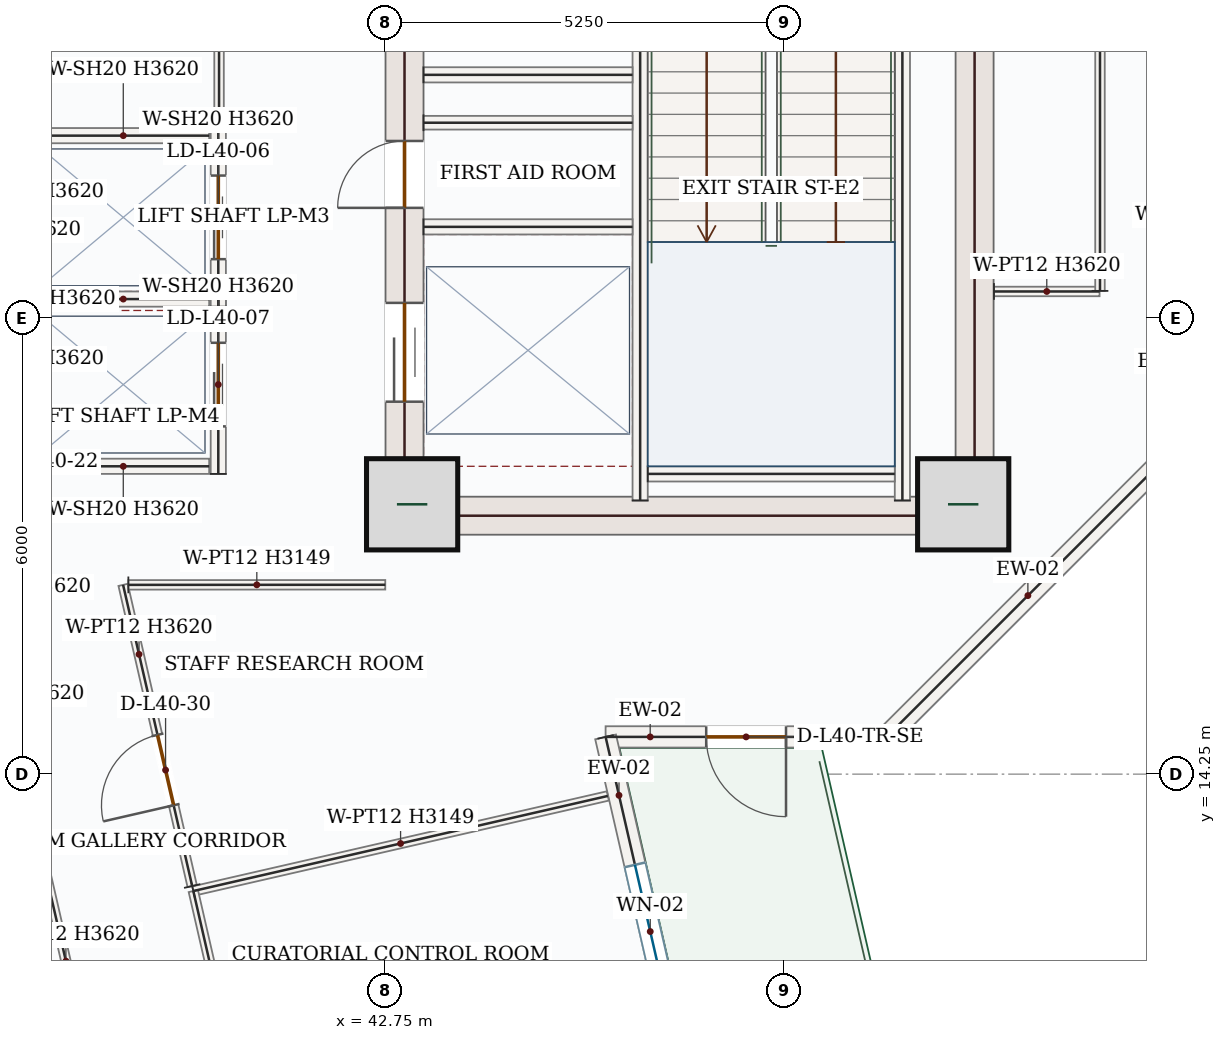
"""IFC4 building model, lengths in metres.
Left out: names, types, materials, properties, quantities, classifications, styles, units other than length and angle.
Written with IfcOpenShell. Run it as: python <this file> out.ifc"""

import sys

from ifc_helpers import new_model, si_unit, direction, frame, frame_2d, origin, origin_2d, place, context, subcontext, project, spatial, rectangle, extrude, source, transform, mapped, element, fill, save


model = new_model("IFC4")
c1 = context("Model", 3, precision=1e-05, world=origin(), true_north=direction((0.0, 1.0)))
c2 = subcontext(c1, "Body", "Model", "MODEL_VIEW")
j1 = project(units=[si_unit("LENGTHUNIT", "METRE"), si_unit("PLANEANGLEUNIT", "RADIAN")], contexts=[c1])
p1 = place(None, origin())
s1 = spatial("IfcSite", under=j1, at=p1, CompositionType="ELEMENT")
p2 = place(p1, origin())
s2 = spatial("IfcBuilding", under=s1, at=p2, CompositionType="ELEMENT")
p3 = place(p2, frame((0.0, 0.0, 174.6)))
s3 = spatial("IfcBuildingStorey", under=s2, at=p3, CompositionType="ELEMENT", Elevation=174.6)
p4 = place(p3, frame((43.0, 17.4, 0.0), z_axis=(0.0, 0.0, 1.0), x_axis=(0.0, 1.0, 0.0)))
e1 = element("IfcWall", 1, at=p4, inside=s3, PredefinedType="SHEAR", context=c2, shape_type="SweptSolid", body=[
    extrude(rectangle(XDim=8.55, YDim=0.5, at=frame_2d((4.275, 0.0))), origin(), (0.0, 0.0, 1.0), 3.62),
])
p5 = place(p4, frame((6.65, 0.0, 0.0)))
e2 = element("IfcOpeningElement", 2, at=p5, cuts=e1, PredefinedType="OPENING", context=c2, shape_type="SweptSolid", body=[
    extrude(rectangle(XDim=1.1, YDim=2.2, at=frame_2d((0.55, 1.1))), frame((0.0, 0.26, 0.0), z_axis=(0.0, -1.0, 0.0), x_axis=(1.0, 0.0, 0.0)), (0.0, 0.0, 1.0), 0.52),
])
p6 = place(p4, frame((1.75, 0.0, 0.0)))
e3 = element("IfcOpeningElement", 3, at=p6, cuts=e1, PredefinedType="OPENING", context=c2, shape_type="SweptSolid", body=[
    extrude(rectangle(XDim=1.3, YDim=2.2, at=frame_2d((0.65, 1.1))), frame((0.0, 0.26, 0.0), z_axis=(0.0, -1.0, 0.0), x_axis=(1.0, 0.0, 0.0)), (0.0, 0.0, 1.0), 0.52),
])
p7 = place(p4, frame((4.3, 0.0, 0.0)))
e4 = element("IfcOpeningElement", 4, at=p7, cuts=e1, PredefinedType="OPENING", context=c2, shape_type="SweptSolid", body=[
    extrude(rectangle(XDim=0.88, YDim=2.1, at=frame_2d((0.44, 1.05))), frame((0.0, 0.26, 0.0), z_axis=(0.0, -1.0, 0.0), x_axis=(1.0, 0.0, 0.0)), (0.0, 0.0, 1.0), 0.52),
])
m1 = source(origin(), c2, "Body", "SweptSolid", [
    extrude(rectangle(XDim=8.55, YDim=0.5, at=frame_2d((4.275, 0.0))), origin(), (0.0, 0.0, 1.0), 3.62),
])
p8 = place(p3, frame((50.5, 17.4, 0.0), z_axis=(0.0, 0.0, 1.0), x_axis=(0.0, 1.0, 0.0)))
e5 = element("IfcWall", 5, at=p8, inside=s3, PredefinedType="SHEAR", context=c2, shape_type="MappedRepresentation", body=[
    mapped(m1, transform((0.0, 0.0, 0.0), x_axis=(1.0, 0.0, 0.0), y_axis=(0.0, 1.0, 0.0), z_axis=(0.0, 0.0, 1.0), scale=1.0)),
])
m2 = source(origin(), c2, "Body", "SweptSolid", [
    extrude(rectangle(XDim=7.0, YDim=0.5, at=frame_2d((3.5, 0.0))), origin(), (0.0, 0.0, 1.0), 3.62),
])
p9 = place(p3, frame((43.25, 17.65, 0.0), z_axis=(0.0, 0.0, 1.0), x_axis=(1.0, 0.0, 0.0)))
e6 = element("IfcWall", 6, at=p9, inside=s3, PredefinedType="SHEAR", context=c2, shape_type="MappedRepresentation", body=[
    mapped(m2, transform((0.0, 0.0, 0.0), x_axis=(1.0, 0.0, 0.0), y_axis=(0.0, 1.0, 0.0), z_axis=(0.0, 0.0, 1.0), scale=1.0)),
])
m3 = source(origin(), c2, "Body", "SweptSolid", [
    extrude(rectangle(XDim=1.2, YDim=1.2, at=origin_2d()), origin(), (0.0, 0.0, 1.0), 3.9),
])
for number, where, z_axis, x_axis in (
    (7, (43.1, 17.8, 0.0), (0.0, 0.0, 1.0), (1.0, 0.0, 0.0)),
    (8, (50.35, 17.8, 0.0), (0.0, 0.0, 1.0), (1.0, 0.0, 0.0)),
):
    element("IfcColumn", number, at=place(p3, frame(where, z_axis=z_axis, x_axis=x_axis)), inside=s3, PredefinedType="COLUMN", context=c2, shape_type="MappedRepresentation", body=[
        mapped(m3, transform((0.0, 0.0, 0.0), x_axis=(1.0, 0.0, 0.0), y_axis=(0.0, 1.0, 0.0), z_axis=(0.0, 0.0, 1.0), scale=1.0)),
    ])
m4 = source(origin(), c2, "Body", "SweptSolid", [
    extrude(rectangle(XDim=5.258, YDim=0.28, at=frame_2d((2.629, 0.0))), origin(), (0.0, 0.0, 1.0), 3.62),
])
p10 = place(p3, frame((53.06, 18.458, 0.0), z_axis=(0.0, 0.0, 1.0), x_axis=(-0.707106781187, -0.707106781187, 0.0)))
e9 = element("IfcWall", 9, at=p10, inside=s3, PredefinedType="SOLIDWALL", context=c2, shape_type="MappedRepresentation", body=[
    mapped(m4, transform((0.0, 0.0, 0.0), x_axis=(1.0, 0.0, 0.0), y_axis=(0.0, 1.0, 0.0), z_axis=(0.0, 0.0, 1.0), scale=1.0)),
])
p11 = place(p3, frame((49.342, 14.74, 0.0), z_axis=(0.0, 0.0, 1.0), x_axis=(-1.0, 0.0, 0.0)))
e10 = element("IfcWall", 10, at=p11, inside=s3, PredefinedType="SOLIDWALL", context=c2, shape_type="SweptSolid", body=[
    extrude(rectangle(XDim=3.697, YDim=0.28, at=frame_2d((1.848, 0.0))), origin(), (0.0, 0.0, 1.0), 3.62),
])
p12 = place(p11, frame((1.323, 0.0, 0.0)))
e11 = element("IfcOpeningElement", 11, at=p12, cuts=e10, PredefinedType="OPENING", context=c2, shape_type="SweptSolid", body=[
    extrude(rectangle(XDim=1.05, YDim=2.15, at=frame_2d((0.525, 1.075))), frame((0.0, 0.15, 0.0), z_axis=(0.0, -1.0, 0.0), x_axis=(1.0, 0.0, 0.0)), (0.0, 0.0, 1.0), 0.3),
])
p13 = place(p3, frame((45.646, 14.74, 0.0), z_axis=(0.0, 0.0, 1.0), x_axis=(0.223562871808, -0.974689510741, 0.0)))
e12 = element("IfcWall", 12, at=p13, inside=s3, PredefinedType="SOLIDWALL", context=c2, shape_type="SweptSolid", body=[
    extrude(rectangle(XDim=5.254, YDim=0.28, at=frame_2d((2.627, 0.0))), origin(), (0.0, 0.0, 1.0), 3.62),
])
p14 = place(p13, frame((1.727, 0.0, 0.85)))
e13 = element("IfcOpeningElement", 13, at=p14, cuts=e12, PredefinedType="OPENING", context=c2, shape_type="SweptSolid", body=[
    extrude(rectangle(XDim=1.8, YDim=1.75, at=frame_2d((0.9, 0.875))), frame((0.0, 0.15, 0.0), z_axis=(0.0, -1.0, 0.0), x_axis=(1.0, 0.0, 0.0)), (0.0, 0.0, 1.0), 0.3),
])
m5 = source(origin(), c2, "Body", "SweptSolid", [
    extrude(rectangle(XDim=7.87, YDim=0.2, at=frame_2d((3.935, 0.0))), origin(), (0.0, 0.0, 1.0), 3.62),
])
p15 = place(p3, frame((49.55, 17.85, 0.0), z_axis=(0.0, 0.0, 1.0), x_axis=(0.0, 1.0, 0.0)))
e14 = element("IfcWall", 14, at=p15, inside=s3, PredefinedType="SOLIDWALL", context=c2, shape_type="MappedRepresentation", body=[
    mapped(m5, transform((0.0, 0.0, 0.0), x_axis=(1.0, 0.0, 0.0), y_axis=(0.0, 1.0, 0.0), z_axis=(0.0, 0.0, 1.0), scale=1.0)),
])
p16 = place(p3, frame((46.1, 17.85, 0.0), z_axis=(0.0, 0.0, 1.0), x_axis=(0.0, 1.0, 0.0)))
e15 = element("IfcWall", 15, at=p16, inside=s3, PredefinedType="SOLIDWALL", context=c2, shape_type="SweptSolid", body=[
    extrude(rectangle(XDim=8.0, YDim=0.2, at=frame_2d((4.0, 0.0))), origin(), (0.0, 0.0, 1.0), 3.62),
])
p17 = place(p16, frame((6.3, 0.0, 0.0)))
e16 = element("IfcOpeningElement", 16, at=p17, cuts=e15, PredefinedType="OPENING", context=c2, shape_type="SweptSolid", body=[
    extrude(rectangle(XDim=1.05, YDim=2.15, at=frame_2d((0.525, 1.075))), frame((0.0, 0.11, 0.0), z_axis=(0.0, -1.0, 0.0), x_axis=(1.0, 0.0, 0.0)), (0.0, 0.0, 1.0), 0.22),
])
m6 = source(origin(), c2, "Body", "SweptSolid", [
    extrude(rectangle(XDim=3.25, YDim=0.2, at=frame_2d((1.625, 0.0))), origin(), (0.0, 0.0, 1.0), 3.62),
])
p18 = place(p3, frame((46.2, 18.2, 0.0), z_axis=(0.0, 0.0, 1.0), x_axis=(1.0, 0.0, 0.0)))
e17 = element("IfcWall", 17, at=p18, inside=s3, PredefinedType="SOLIDWALL", context=c2, shape_type="MappedRepresentation", body=[
    mapped(m6, transform((0.0, 0.0, 0.0), x_axis=(1.0, 0.0, 0.0), y_axis=(0.0, 1.0, 0.0), z_axis=(0.0, 0.0, 1.0), scale=1.0)),
])
m7 = source(origin(), c2, "Body", "SweptSolid", [
    extrude(rectangle(XDim=2.75, YDim=0.2, at=frame_2d((1.375, 0.0))), origin(), (0.0, 0.0, 1.0), 3.62),
])
for number, where, z_axis, x_axis in (
    (18, (43.25, 23.45, 0.0), (0.0, 0.0, 1.0), (1.0, 0.0, 0.0)),
    (19, (43.25, 21.45, 0.0), (0.0, 0.0, 1.0), (1.0, 0.0, 0.0)),
):
    element("IfcWall", number, at=place(p3, frame(where, z_axis=z_axis, x_axis=x_axis)), inside=s3, PredefinedType="SOLIDWALL", context=c2, shape_type="MappedRepresentation", body=[
        mapped(m7, transform((0.0, 0.0, 0.0), x_axis=(1.0, 0.0, 0.0), y_axis=(0.0, 1.0, 0.0), z_axis=(0.0, 0.0, 1.0), scale=1.0)),
    ])
m8 = source(origin(), c2, "Body", "SweptSolid", [
    extrude(rectangle(XDim=2.75, YDim=0.18, at=frame_2d((1.375, 0.0))), origin(), (0.0, 0.0, 1.0), 3.62),
])
p19 = place(p3, frame((43.25, 22.82, 0.0), z_axis=(0.0, 0.0, 1.0), x_axis=(1.0, 0.0, 0.0)))
e20 = element("IfcWall", 20, at=p19, inside=s3, PredefinedType="PARTITIONING", context=c2, shape_type="MappedRepresentation", body=[
    mapped(m8, transform((0.0, 0.0, 0.0), x_axis=(1.0, 0.0, 0.0), y_axis=(0.0, 1.0, 0.0), z_axis=(0.0, 0.0, 1.0), scale=1.0)),
])
p20 = place(p3, frame((40.55, 20.4, 0.0), z_axis=(0.0, 0.0, 1.0), x_axis=(0.0, 1.0, 0.0)))
e21 = element("IfcWall", 21, at=p20, inside=s3, PredefinedType="SOLIDWALL", context=c2, shape_type="SweptSolid", body=[
    extrude(rectangle(XDim=2.35, YDim=0.2, at=frame_2d((1.175, 0.0))), origin(), (0.0, 0.0, 1.0), 3.62),
])
p21 = place(p20, frame((0.625, 0.0, 0.0)))
e22 = element("IfcOpeningElement", 22, at=p21, cuts=e21, PredefinedType="OPENING", context=c2, shape_type="SweptSolid", body=[
    extrude(rectangle(XDim=1.1, YDim=2.15, at=frame_2d((0.55, 1.075))), frame((0.0, 0.11, 0.0), z_axis=(0.0, -1.0, 0.0), x_axis=(1.0, 0.0, 0.0)), (0.0, 0.0, 1.0), 0.22),
])
m9 = source(origin(), c2, "Body", "SweptSolid", [
    extrude(rectangle(XDim=2.26, YDim=0.2, at=frame_2d((1.13, 0.0))), origin(), (0.0, 0.0, 1.0), 3.62),
])
for number, where, z_axis, x_axis in (
    (23, (38.17, 20.5, 0.0), (0.0, 0.0, 1.0), (1.0, 0.0, 0.0)),
    (24, (38.17, 22.65, 0.0), (0.0, 0.0, 1.0), (1.0, 0.0, 0.0)),
):
    element("IfcWall", number, at=place(p3, frame(where, z_axis=z_axis, x_axis=x_axis)), inside=s3, PredefinedType="SOLIDWALL", context=c2, shape_type="MappedRepresentation", body=[
        mapped(m9, transform((0.0, 0.0, 0.0), x_axis=(1.0, 0.0, 0.0), y_axis=(0.0, 1.0, 0.0), z_axis=(0.0, 0.0, 1.0), scale=1.0)),
    ])
p22 = place(p3, frame((40.55, 18.2, 0.0), z_axis=(0.0, 0.0, 1.0), x_axis=(0.0, 1.0, 0.0)))
e25 = element("IfcWall", 25, at=p22, inside=s3, PredefinedType="SOLIDWALL", context=c2, shape_type="SweptSolid", body=[
    extrude(rectangle(XDim=2.35, YDim=0.2, at=frame_2d((1.175, 0.0))), origin(), (0.0, 0.0, 1.0), 3.62),
])
p23 = place(p22, frame((0.625, 0.0, 0.0)))
e26 = element("IfcOpeningElement", 26, at=p23, cuts=e25, PredefinedType="OPENING", context=c2, shape_type="SweptSolid", body=[
    extrude(rectangle(XDim=1.1, YDim=2.15, at=frame_2d((0.55, 1.075))), frame((0.0, 0.11, 0.0), z_axis=(0.0, -1.0, 0.0), x_axis=(1.0, 0.0, 0.0)), (0.0, 0.0, 1.0), 0.22),
])
p24 = place(p3, frame((38.17, 18.3, 0.0), z_axis=(0.0, 0.0, 1.0), x_axis=(1.0, 0.0, 0.0)))
e27 = element("IfcWall", 27, at=p24, inside=s3, PredefinedType="SOLIDWALL", context=c2, shape_type="MappedRepresentation", body=[
    mapped(m9, transform((0.0, 0.0, 0.0), x_axis=(1.0, 0.0, 0.0), y_axis=(0.0, 1.0, 0.0), z_axis=(0.0, 0.0, 1.0), scale=1.0)),
])
m10 = source(origin(), c2, "Body", "SweptSolid", [
    extrude(rectangle(XDim=3.042, YDim=0.125, at=frame_2d((1.521, 0.0))), origin(), (0.0, 0.0, 1.0), 3.62),
])
p25 = place(p3, frame((40.56, 25.792, 0.0), z_axis=(0.0, 0.0, 1.0), x_axis=(0.0, -1.0, 0.0)))
e28 = element("IfcWall", 28, at=p25, inside=s3, PredefinedType="PARTITIONING", context=c2, shape_type="MappedRepresentation", body=[
    mapped(m10, transform((0.0, 0.0, 0.0), x_axis=(1.0, 0.0, 0.0), y_axis=(0.0, 1.0, 0.0), z_axis=(0.0, 0.0, 1.0), scale=1.0)),
])
m11 = source(origin(), c2, "Body", "SweptSolid", [
    extrude(rectangle(XDim=5.595, YDim=0.125, at=frame_2d((2.797, 0.0))), origin(), (0.0, 0.0, 1.0), 3.149),
])
p26 = place(p3, frame((40.221, 12.712, 0.0), z_axis=(0.0, 0.0, 1.0), x_axis=(0.974683801791, 0.223587760235, 0.0)))
e29 = element("IfcWall", 29, at=p26, inside=s3, PredefinedType="PARTITIONING", context=c2, shape_type="MappedRepresentation", body=[
    mapped(m11, transform((0.0, 0.0, 0.0), x_axis=(1.0, 0.0, 0.0), y_axis=(0.0, 1.0, 0.0), z_axis=(0.0, 0.0, 1.0), scale=1.0)),
])
p27 = place(p3, frame((41.573, 6.82, 0.0), z_axis=(0.0, 0.0, 1.0), x_axis=(-0.223588000718, 0.974683746625, 0.0)))
e30 = element("IfcWall", 30, at=p27, inside=s3, PredefinedType="PARTITIONING", context=c2, shape_type="SweptSolid", body=[
    extrude(rectangle(XDim=6.045, YDim=0.125, at=frame_2d((3.022, 0.0))), origin(), (0.0, 0.0, 1.0), 3.62),
])
p28 = place(p27, frame((3.312, 0.0, 0.0)))
e31 = element("IfcOpeningElement", 31, at=p28, cuts=e30, PredefinedType="OPENING", context=c2, shape_type="SweptSolid", body=[
    extrude(rectangle(XDim=0.95, YDim=2.15, at=frame_2d((0.475, 1.075))), frame((0.0, 0.073, 0.0), z_axis=(0.0, -1.0, 0.0), x_axis=(1.0, 0.0, 0.0)), (0.0, 0.0, 1.0), 0.145),
])
p29 = place(p3, frame((40.206, 12.778, 0.0), z_axis=(0.0, 0.0, 1.0), x_axis=(-0.223552104445, 0.97469198037, 0.0)))
e32 = element("IfcWall", 32, at=p29, inside=s3, PredefinedType="PARTITIONING", context=c2, shape_type="SweptSolid", body=[
    extrude(rectangle(XDim=4.065, YDim=0.125, at=frame_2d((2.032, 0.0))), origin(), (0.0, 0.0, 1.0), 3.62),
])
p30 = place(p29, frame((1.09, 0.0, 0.0)))
e33 = element("IfcOpeningElement", 33, at=p30, cuts=e32, PredefinedType="OPENING", context=c2, shape_type="SweptSolid", body=[
    extrude(rectangle(XDim=0.95, YDim=2.15, at=frame_2d((0.475, 1.075))), frame((0.0, 0.073, 0.0), z_axis=(0.0, -1.0, 0.0), x_axis=(1.0, 0.0, 0.0)), (0.0, 0.0, 1.0), 0.145),
])
m12 = source(origin(), c2, "Body", "SweptSolid", [
    extrude(rectangle(XDim=3.38, YDim=0.125, at=frame_2d((1.69, 0.0))), origin(), (0.0, 0.0, 1.0), 3.149),
])
p31 = place(p3, frame((39.367, 16.74, 0.0), z_axis=(0.0, 0.0, 1.0), x_axis=(0.999999934779, 0.000361167269, 0.0)))
e34 = element("IfcWall", 34, at=p31, inside=s3, PredefinedType="PARTITIONING", context=c2, shape_type="MappedRepresentation", body=[
    mapped(m12, transform((0.0, 0.0, 0.0), x_axis=(1.0, 0.0, 0.0), y_axis=(0.0, 1.0, 0.0), z_axis=(0.0, 0.0, 1.0), scale=1.0)),
])
p32 = place(p3, frame((38.227, 13.178, 0.0), z_axis=(0.0, 0.0, 1.0), x_axis=(0.223573066544, -0.974687172336, 0.0)))
e35 = element("IfcWall", 35, at=p32, inside=s3, PredefinedType="PARTITIONING", context=c2, shape_type="SweptSolid", body=[
    extrude(rectangle(XDim=6.945, YDim=0.125, at=frame_2d((3.473, 0.0))), origin(), (0.0, 0.0, 1.0), 3.62),
])
p33 = place(p32, frame((2.998, 0.0, 0.0)))
e36 = element("IfcOpeningElement", 36, at=p33, cuts=e35, PredefinedType="OPENING", context=c2, shape_type="SweptSolid", body=[
    extrude(rectangle(XDim=0.95, YDim=2.15, at=frame_2d((0.475, 1.075))), frame((0.0, 0.073, 0.0), z_axis=(0.0, -1.0, 0.0), x_axis=(1.0, 0.0, 0.0)), (0.0, 0.0, 1.0), 0.145),
])
m13 = source(origin(), c2, "Body", "SweptSolid", [
    extrude(rectangle(XDim=1.389, YDim=0.125, at=frame_2d((0.695, 0.0))), origin(), (0.0, 0.0, 1.0), 3.62),
])
p34 = place(p3, frame((50.755, 20.6, 0.0), z_axis=(0.0, 0.0, 1.0), x_axis=(1.0, 0.0, 0.0)))
e37 = element("IfcWall", 37, at=p34, inside=s3, PredefinedType="PARTITIONING", context=c2, shape_type="MappedRepresentation", body=[
    mapped(m13, transform((0.0, 0.0, 0.0), x_axis=(1.0, 0.0, 0.0), y_axis=(0.0, 1.0, 0.0), z_axis=(0.0, 0.0, 1.0), scale=1.0)),
])
m14 = source(origin(), c2, "Body", "SweptSolid", [
    extrude(rectangle(XDim=9.153, YDim=0.125, at=frame_2d((4.577, 0.0))), origin(), (0.0, 0.0, 1.0), 2.766),
])
p35 = place(p3, frame((52.15, 20.608, 0.0), z_axis=(0.0, 0.0, 1.0), x_axis=(2.6672357e-05, 0.999999999644, 0.0)))
e38 = element("IfcWall", 38, at=p35, inside=s3, PredefinedType="PARTITIONING", context=c2, shape_type="MappedRepresentation", body=[
    mapped(m14, transform((0.0, 0.0, 0.0), x_axis=(1.0, 0.0, 0.0), y_axis=(0.0, 1.0, 0.0), z_axis=(0.0, 0.0, 1.0), scale=1.0)),
])
m15 = source(origin(), c2, "Body", "SweptSolid", [
    extrude(rectangle(XDim=1.05, YDim=2.15, at=frame_2d((0.525, 1.075))), frame((0.0, 0.025, 0.0), z_axis=(0.0, -1.0, 0.0), x_axis=(1.0, 0.0, 0.0)), (0.0, 0.0, 1.0), 0.05),
])
p36 = place(p12, origin())
e39 = element("IfcDoor", 39, at=p36, inside=s3, OperationType="SINGLE_SWING_LEFT", PredefinedType="DOOR", context=c2, shape_type="MappedRepresentation", body=[
    mapped(m15, transform((0.0, 0.0, 0.0), x_axis=(1.0, 0.0, 0.0), y_axis=(0.0, 1.0, 0.0), z_axis=(0.0, 0.0, 1.0), scale=1.0)),
])
fill(e11, e39)
m16 = source(origin(), c2, "Body", "SweptSolid", [
    extrude(rectangle(XDim=1.8, YDim=1.75, at=frame_2d((0.9, 0.875))), frame((0.0, 0.03, 0.0), z_axis=(0.0, -1.0, 0.0), x_axis=(1.0, 0.0, 0.0)), (0.0, 0.0, 1.0), 0.06),
])
p37 = place(p14, origin())
e40 = element("IfcWindow", 40, at=p37, inside=s3, PartitioningType="DOUBLE_PANEL_VERTICAL", PredefinedType="WINDOW", context=c2, shape_type="MappedRepresentation", body=[
    mapped(m16, transform((0.0, 0.0, 0.0), x_axis=(1.0, 0.0, 0.0), y_axis=(0.0, 1.0, 0.0), z_axis=(0.0, 0.0, 1.0), scale=1.0)),
])
fill(e13, e40)
m17 = source(origin(), c2, "Body", "SweptSolid", [
    extrude(rectangle(XDim=1.3, YDim=2.2, at=frame_2d((0.65, 1.1))), frame((0.0, 0.025, 0.0), z_axis=(0.0, -1.0, 0.0), x_axis=(1.0, 0.0, 0.0)), (0.0, 0.0, 1.0), 0.05),
])
p38 = place(p6, origin())
e41 = element("IfcDoor", 41, at=p38, inside=s3, OperationType="DOUBLE_DOOR_SLIDING", PredefinedType="DOOR", context=c2, shape_type="MappedRepresentation", body=[
    mapped(m17, transform((0.0, 0.0, 0.0), x_axis=(1.0, 0.0, 0.0), y_axis=(0.0, 1.0, 0.0), z_axis=(0.0, 0.0, 1.0), scale=1.0)),
])
fill(e3, e41)
m18 = source(origin(), c2, "Body", "SweptSolid", [
    extrude(rectangle(XDim=0.88, YDim=2.1, at=frame_2d((0.44, 1.05))), frame((0.0, 0.025, 0.0), z_axis=(0.0, -1.0, 0.0), x_axis=(1.0, 0.0, 0.0)), (0.0, 0.0, 1.0), 0.05),
])
p39 = place(p7, origin())
e42 = element("IfcDoor", 42, at=p39, inside=s3, OperationType="SINGLE_SWING_LEFT", PredefinedType="DOOR", context=c2, shape_type="MappedRepresentation", body=[
    mapped(m18, transform((0.0, 0.0, 0.0), x_axis=(1.0, 0.0, 0.0), y_axis=(0.0, 1.0, 0.0), z_axis=(0.0, 0.0, 1.0), scale=1.0)),
])
fill(e4, e42)
m19 = source(origin(), c2, "Body", "SweptSolid", [
    extrude(rectangle(XDim=1.1, YDim=2.15, at=frame_2d((0.55, 1.075))), frame((0.0, 0.025, 0.0), z_axis=(0.0, -1.0, 0.0), x_axis=(1.0, 0.0, 0.0)), (0.0, 0.0, 1.0), 0.05),
])
p40 = place(p21, origin())
e43 = element("IfcDoor", 43, at=p40, inside=s3, OperationType="DOUBLE_DOOR_SLIDING", PredefinedType="DOOR", context=c2, shape_type="MappedRepresentation", body=[
    mapped(m19, transform((0.0, 0.0, 0.0), x_axis=(1.0, 0.0, 0.0), y_axis=(0.0, 1.0, 0.0), z_axis=(0.0, 0.0, 1.0), scale=1.0)),
])
fill(e22, e43)
p41 = place(p23, origin())
e44 = element("IfcDoor", 44, at=p41, inside=s3, OperationType="DOUBLE_DOOR_SLIDING", PredefinedType="DOOR", context=c2, shape_type="MappedRepresentation", body=[
    mapped(m19, transform((0.0, 0.0, 0.0), x_axis=(1.0, 0.0, 0.0), y_axis=(0.0, 1.0, 0.0), z_axis=(0.0, 0.0, 1.0), scale=1.0)),
])
fill(e26, e44)
m20 = source(origin(), c2, "Body", "SweptSolid", [
    extrude(rectangle(XDim=0.95, YDim=2.15, at=frame_2d((0.475, 1.075))), frame((0.0, 0.025, 0.0), z_axis=(0.0, -1.0, 0.0), x_axis=(1.0, 0.0, 0.0)), (0.0, 0.0, 1.0), 0.05),
])
p42 = place(p30, origin())
e45 = element("IfcDoor", 45, at=p42, inside=s3, OperationType="SINGLE_SWING_LEFT", PredefinedType="DOOR", context=c2, shape_type="MappedRepresentation", body=[
    mapped(m20, transform((0.0, 0.0, 0.0), x_axis=(1.0, 0.0, 0.0), y_axis=(0.0, 1.0, 0.0), z_axis=(0.0, 0.0, 1.0), scale=1.0)),
])
fill(e33, e45)
save(model, sys.argv[1])
